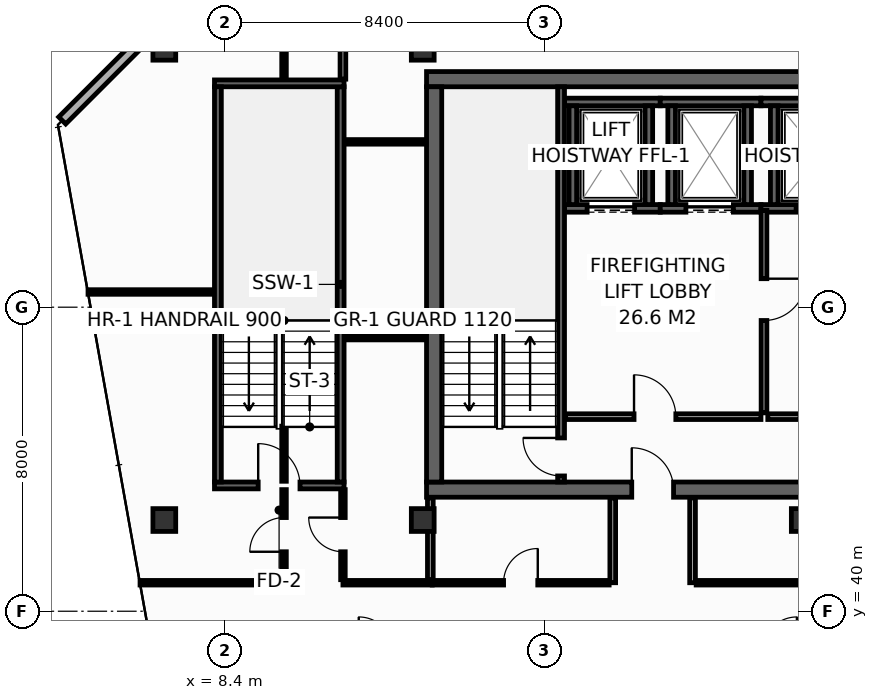
"""IFC4 building model, lengths in metres.
Left out: names, types, materials, properties, quantities, classifications, styles, units other than length and angle.
Written with IfcOpenShell. Run it as: python <this file> out.ifc"""

import sys

from ifc_helpers import new_model, si_unit, direction, frame, frame_2d, origin, origin_2d, place, context, subcontext, project, spatial, rectangle, hollow_rectangle, extrude, element, fill, save


model = new_model("IFC4")
c1 = context("Model", 3, precision=1e-05, world=origin(), true_north=direction((0.0, 1.0)))
c2 = subcontext(c1, "Body", "Model", "MODEL_VIEW")
j1 = project(units=[si_unit("LENGTHUNIT", "METRE"), si_unit("PLANEANGLEUNIT", "RADIAN")], contexts=[c1])
p1 = place(None, origin())
s1 = spatial("IfcSite", under=j1, at=p1, CompositionType="ELEMENT")
p2 = place(p1, origin())
s2 = spatial("IfcBuilding", under=s1, at=p2, CompositionType="ELEMENT")
p3 = place(p2, frame((0.0, 0.0, 264.8)))
s3 = spatial("IfcBuildingStorey", under=s2, at=p3, CompositionType="ELEMENT", Elevation=264.8)
p4 = place(p3, frame((13.7, 43.2, 0.0), z_axis=(0.0, 0.0, 1.0), x_axis=(1.0, 0.0, 0.0)))
e1 = element("IfcWall", 1, at=p4, inside=s3, PredefinedType="SHEAR", context=c2, shape_type="SweptSolid", body=[
    extrude(rectangle(XDim=32.5, YDim=0.4, at=frame_2d((16.25, 0.0))), origin(), (0.0, 0.0, 1.0), 3.55),
])
p5 = place(p4, frame((5.4, 0.0, 0.0)))
e2 = element("IfcOpeningElement", 2, at=p5, cuts=e1, PredefinedType="OPENING", context=c2, shape_type="SweptSolid", body=[
    extrude(rectangle(XDim=1.1, YDim=2.15, at=frame_2d((0.55, 1.075))), frame((0.0, 0.21, 0.0), z_axis=(0.0, -1.0, 0.0), x_axis=(1.0, 0.0, 0.0)), (0.0, 0.0, 1.0), 0.42),
])
p6 = place(p4, frame((25.6, 0.0, 0.0)))
e3 = element("IfcOpeningElement", 3, at=p6, cuts=e1, PredefinedType="OPENING", context=c2, shape_type="SweptSolid", body=[
    extrude(rectangle(XDim=1.1, YDim=2.15, at=frame_2d((0.55, 1.075))), frame((0.0, 0.21, 0.0), z_axis=(0.0, -1.0, 0.0), x_axis=(1.0, 0.0, 0.0)), (0.0, 0.0, 1.0), 0.42),
])
p7 = place(p3, frame((13.7, 54.0, 0.0), z_axis=(0.0, 0.0, 1.0), x_axis=(1.0, 0.0, 0.0)))
e4 = element("IfcWall", 4, at=p7, inside=s3, PredefinedType="SHEAR", context=c2, shape_type="SweptSolid", body=[
    extrude(rectangle(XDim=32.5, YDim=0.4, at=frame_2d((16.25, 0.0))), origin(), (0.0, 0.0, 1.0), 3.55),
])
p8 = place(p3, frame((13.9, 43.4, 0.0), z_axis=(0.0, 0.0, 1.0), x_axis=(0.0, 1.0, 0.0)))
e5 = element("IfcWall", 5, at=p8, inside=s3, PredefinedType="SHEAR", context=c2, shape_type="SweptSolid", body=[
    extrude(rectangle(XDim=10.4, YDim=0.4, at=frame_2d((5.2, 0.0))), origin(), (0.0, 0.0, 1.0), 3.55),
])
for number, where, z_axis, x_axis in (
    (6, (6.8, 54.8, 0.0), (0.0, 0.0, 1.0), (1.0, 0.0, 0.0)),
    (7, (13.6, 54.8, 0.0), (0.0, 0.0, 1.0), (1.0, 0.0, 0.0)),
    (8, (6.8, 42.4, 0.0), (0.0, 0.0, 1.0), (1.0, 0.0, 0.0)),
    (9, (13.6, 42.4, 0.0), (0.0, 0.0, 1.0), (1.0, 0.0, 0.0)),
    (10, (23.6, 42.4, 0.0), (0.0, 0.0, 1.0), (1.0, 0.0, 0.0)),
):
    element("IfcColumn", number, at=place(p3, frame(where, z_axis=z_axis, x_axis=x_axis)), inside=s3, PredefinedType="COLUMN", context=c2, shape_type="SweptSolid", body=[
        extrude(hollow_rectangle(XDim=0.6, YDim=0.6, WallThickness=0.028, at=origin_2d()), origin(), (0.0, 0.0, 1.0), 3.8),
    ])
p9 = place(p3, frame((17.33, 50.6, 0.0), z_axis=(0.0, 0.0, 1.0), x_axis=(1.0, 0.0, 0.0)))
e11 = element("IfcWall", 11, at=p9, inside=s3, PredefinedType="SHEAR", context=c2, shape_type="SweptSolid", body=[
    extrude(rectangle(XDim=2.52, YDim=0.2, at=frame_2d((1.26, 0.0))), origin(), (0.0, 0.0, 1.0), 3.55),
])
p10 = place(p9, frame((0.595, 0.0, 0.0)))
e12 = element("IfcOpeningElement", 12, at=p10, cuts=e11, PredefinedType="OPENING", context=c2, shape_type="SweptSolid", body=[
    extrude(rectangle(XDim=1.25, YDim=2.3, at=frame_2d((0.625, 1.15))), frame((0.0, 0.11, 0.0), z_axis=(0.0, -1.0, 0.0), x_axis=(1.0, 0.0, 0.0)), (0.0, 0.0, 1.0), 0.22),
])
p11 = place(p3, frame((17.33, 53.4, 0.0), z_axis=(0.0, 0.0, 1.0), x_axis=(1.0, 0.0, 0.0)))
e13 = element("IfcWall", 13, at=p11, inside=s3, PredefinedType="SHEAR", context=c2, shape_type="SweptSolid", body=[
    extrude(rectangle(XDim=2.52, YDim=0.2, at=frame_2d((1.26, 0.0))), origin(), (0.0, 0.0, 1.0), 3.55),
])
for number, where, z_axis, x_axis in (
    (14, (17.55, 50.7, 0.0), (0.0, 0.0, 1.0), (0.0, 1.0, 0.0)),
    (15, (19.55, 50.7, 0.0), (0.0, 0.0, 1.0), (0.0, 1.0, 0.0)),
):
    element("IfcWall", number, at=place(p3, frame(where, z_axis=z_axis, x_axis=x_axis)), inside=s3, PredefinedType="SHEAR", context=c2, shape_type="SweptSolid", body=[
        extrude(rectangle(XDim=2.6, YDim=0.2, at=frame_2d((1.3, 0.0))), origin(), (0.0, 0.0, 1.0), 3.55),
    ])
p12 = place(p3, frame((19.85, 50.6, 0.0), z_axis=(0.0, 0.0, 1.0), x_axis=(1.0, 0.0, 0.0)))
e16 = element("IfcWall", 16, at=p12, inside=s3, PredefinedType="SHEAR", context=c2, shape_type="SweptSolid", body=[
    extrude(rectangle(XDim=2.65, YDim=0.2, at=frame_2d((1.325, 0.0))), origin(), (0.0, 0.0, 1.0), 3.55),
])
p13 = place(p12, frame((0.675, 0.0, 0.0)))
e17 = element("IfcOpeningElement", 17, at=p13, cuts=e16, PredefinedType="OPENING", context=c2, shape_type="SweptSolid", body=[
    extrude(rectangle(XDim=1.25, YDim=2.3, at=frame_2d((0.625, 1.15))), frame((0.0, 0.11, 0.0), z_axis=(0.0, -1.0, 0.0), x_axis=(1.0, 0.0, 0.0)), (0.0, 0.0, 1.0), 0.22),
])
p14 = place(p3, frame((19.85, 53.4, 0.0), z_axis=(0.0, 0.0, 1.0), x_axis=(1.0, 0.0, 0.0)))
e18 = element("IfcWall", 18, at=p14, inside=s3, PredefinedType="SHEAR", context=c2, shape_type="SweptSolid", body=[
    extrude(rectangle(XDim=2.65, YDim=0.2, at=frame_2d((1.325, 0.0))), origin(), (0.0, 0.0, 1.0), 3.55),
])
for number, where, z_axis, x_axis in (
    (19, (20.15, 50.7, 0.0), (0.0, 0.0, 1.0), (0.0, 1.0, 0.0)),
    (20, (22.15, 50.7, 0.0), (0.0, 0.0, 1.0), (0.0, 1.0, 0.0)),
):
    element("IfcWall", number, at=place(p3, frame(where, z_axis=z_axis, x_axis=x_axis)), inside=s3, PredefinedType="SHEAR", context=c2, shape_type="SweptSolid", body=[
        extrude(rectangle(XDim=2.6, YDim=0.2, at=frame_2d((1.3, 0.0))), origin(), (0.0, 0.0, 1.0), 3.55),
    ])
p15 = place(p3, frame((22.5, 50.6, 0.0), z_axis=(0.0, 0.0, 1.0), x_axis=(1.0, 0.0, 0.0)))
e21 = element("IfcWall", 21, at=p15, inside=s3, PredefinedType="SHEAR", context=c2, shape_type="SweptSolid", body=[
    extrude(rectangle(XDim=2.85, YDim=0.2, at=frame_2d((1.425, 0.0))), origin(), (0.0, 0.0, 1.0), 3.55),
])
p16 = place(p15, frame((0.925, 0.0, 0.0)))
e22 = element("IfcOpeningElement", 22, at=p16, cuts=e21, PredefinedType="OPENING", context=c2, shape_type="SweptSolid", body=[
    extrude(rectangle(XDim=1.25, YDim=2.3, at=frame_2d((0.625, 1.15))), frame((0.0, 0.11, 0.0), z_axis=(0.0, -1.0, 0.0), x_axis=(1.0, 0.0, 0.0)), (0.0, 0.0, 1.0), 0.22),
])
p17 = place(p3, frame((22.5, 53.4, 0.0), z_axis=(0.0, 0.0, 1.0), x_axis=(1.0, 0.0, 0.0)))
e23 = element("IfcWall", 23, at=p17, inside=s3, PredefinedType="SHEAR", context=c2, shape_type="SweptSolid", body=[
    extrude(rectangle(XDim=2.85, YDim=0.2, at=frame_2d((1.425, 0.0))), origin(), (0.0, 0.0, 1.0), 3.55),
])
p18 = place(p3, frame((22.85, 50.7, 0.0), z_axis=(0.0, 0.0, 1.0), x_axis=(0.0, 1.0, 0.0)))
e24 = element("IfcWall", 24, at=p18, inside=s3, PredefinedType="SHEAR", context=c2, shape_type="SweptSolid", body=[
    extrude(rectangle(XDim=2.6, YDim=0.2, at=frame_2d((1.3, 0.0))), origin(), (0.0, 0.0, 1.0), 3.55),
])
p19 = place(p3, frame((17.24, 43.4, 0.0), z_axis=(0.0, 0.0, 1.0), x_axis=(0.0, 1.0, 0.0)))
e25 = element("IfcWall", 25, at=p19, inside=s3, PredefinedType="SHEAR", context=c2, shape_type="SweptSolid", body=[
    extrude(rectangle(XDim=10.4, YDim=0.18, at=frame_2d((5.2, 0.0))), origin(), (0.0, 0.0, 1.0), 3.55),
])
p20 = place(p19, frame((0.16, 0.0, 0.0)))
e26 = element("IfcOpeningElement", 26, at=p20, cuts=e25, PredefinedType="OPENING", context=c2, shape_type="SweptSolid", body=[
    extrude(rectangle(XDim=1.0, YDim=2.15, at=frame_2d((0.5, 1.075))), frame((0.0, 0.1, 0.0), z_axis=(0.0, -1.0, 0.0), x_axis=(1.0, 0.0, 0.0)), (0.0, 0.0, 1.0), 0.2),
])
p21 = place(p3, frame((8.12, 43.31, 0.0), z_axis=(0.0, 0.0, 1.0), x_axis=(1.0, 0.0, 0.0)))
e27 = element("IfcWall", 27, at=p21, inside=s3, PredefinedType="SHEAR", context=c2, shape_type="SweptSolid", body=[
    extrude(rectangle(XDim=3.41, YDim=0.18, at=frame_2d((1.705, 0.0))), origin(), (0.0, 0.0, 1.0), 3.55),
])
p22 = place(p21, frame((1.15, 0.0, 0.0)))
e28 = element("IfcOpeningElement", 28, at=p22, cuts=e27, PredefinedType="OPENING", context=c2, shape_type="SweptSolid", body=[
    extrude(rectangle(XDim=1.1, YDim=2.15, at=frame_2d((0.55, 1.075))), frame((0.0, 0.1, 0.0), z_axis=(0.0, -1.0, 0.0), x_axis=(1.0, 0.0, 0.0)), (0.0, 0.0, 1.0), 0.2),
])
p23 = place(p3, frame((11.44, 43.4, 0.0), z_axis=(0.0, 0.0, 1.0), x_axis=(0.0, 1.0, 0.0)))
e29 = element("IfcWall", 29, at=p23, inside=s3, PredefinedType="SHEAR", context=c2, shape_type="SweptSolid", body=[
    extrude(rectangle(XDim=10.4, YDim=0.18, at=frame_2d((5.2, 0.0))), origin(), (0.0, 0.0, 1.0), 3.55),
])
p24 = place(p3, frame((11.53, 53.89, 0.0), z_axis=(0.0, 0.0, 1.0), x_axis=(-1.0, 0.0, 0.0)))
e30 = element("IfcWall", 30, at=p24, inside=s3, PredefinedType="SHEAR", context=c2, shape_type="SweptSolid", body=[
    extrude(rectangle(XDim=3.41, YDim=0.18, at=frame_2d((1.705, 0.0))), origin(), (0.0, 0.0, 1.0), 3.55),
])
p25 = place(p3, frame((8.21, 53.8, 0.0), z_axis=(0.0, 0.0, 1.0), x_axis=(0.0, -1.0, 0.0)))
e31 = element("IfcWall", 31, at=p25, inside=s3, PredefinedType="SHEAR", context=c2, shape_type="SweptSolid", body=[
    extrude(rectangle(XDim=10.4, YDim=0.18, at=frame_2d((5.2, 0.0))), origin(), (0.0, 0.0, 1.0), 3.55),
])
p26 = place(p3, frame((17.36, 45.12, 0.0), z_axis=(0.0, 0.0, 1.0), x_axis=(1.0, 0.0, 0.0)))
e32 = element("IfcWall", 32, at=p26, inside=s3, PredefinedType="PARTITIONING", context=c2, shape_type="SweptSolid", body=[
    extrude(rectangle(XDim=5.14, YDim=0.15, at=frame_2d((2.57, 0.0))), origin(), (0.0, 0.0, 1.0), 3.55),
])
p27 = place(p26, frame((1.8, 0.0, 0.0)))
e33 = element("IfcOpeningElement", 33, at=p27, cuts=e32, PredefinedType="OPENING", context=c2, shape_type="SweptSolid", body=[
    extrude(rectangle(XDim=1.1, YDim=2.15, at=frame_2d((0.55, 1.075))), frame((0.0, 0.085, 0.0), z_axis=(0.0, -1.0, 0.0), x_axis=(1.0, 0.0, 0.0)), (0.0, 0.0, 1.0), 0.17),
])
p28 = place(p3, frame((22.58, 50.55, 0.0), z_axis=(0.0, 0.0, 1.0), x_axis=(0.0, -1.0, 0.0)))
e34 = element("IfcWall", 34, at=p28, inside=s3, PredefinedType="PARTITIONING", context=c2, shape_type="SweptSolid", body=[
    extrude(rectangle(XDim=5.33, YDim=0.15, at=frame_2d((2.665, 0.0))), origin(), (0.0, 0.0, 1.0), 3.55),
])
p29 = place(p28, frame((1.8, 0.0, 0.0)))
e35 = element("IfcOpeningElement", 35, at=p29, cuts=e34, PredefinedType="OPENING", context=c2, shape_type="SweptSolid", body=[
    extrude(rectangle(XDim=1.1, YDim=2.15, at=frame_2d((0.55, 1.075))), frame((0.0, 0.085, 0.0), z_axis=(0.0, -1.0, 0.0), x_axis=(1.0, 0.0, 0.0)), (0.0, 0.0, 1.0), 0.17),
])
p30 = place(p3, frame((22.68, 45.12, 0.0), z_axis=(0.0, 0.0, 1.0), x_axis=(1.0, 0.0, 0.0)))
e36 = element("IfcWall", 36, at=p30, inside=s3, PredefinedType="PARTITIONING", context=c2, shape_type="SweptSolid", body=[
    extrude(rectangle(XDim=2.92, YDim=0.15, at=frame_2d((1.46, 0.0))), origin(), (0.0, 0.0, 1.0), 3.55),
])
p31 = place(p30, frame((0.85, 0.0, 0.0)))
e37 = element("IfcOpeningElement", 37, at=p31, cuts=e36, PredefinedType="OPENING", context=c2, shape_type="SweptSolid", body=[
    extrude(rectangle(XDim=1.1, YDim=2.15, at=frame_2d((0.55, 1.075))), frame((0.0, 0.085, 0.0), z_axis=(0.0, -1.0, 0.0), x_axis=(1.0, 0.0, 0.0)), (0.0, 0.0, 1.0), 0.17),
])
p32 = place(p3, frame((7.087, 55.887, 0.0), z_axis=(0.0, 0.0, 1.0), x_axis=(-0.707106781187, -0.707106781187, 0.0)))
e38 = element("IfcWall", 38, at=p32, inside=s3, PredefinedType="STANDARD", context=c2, shape_type="SweptSolid", body=[
    extrude(rectangle(XDim=4.206, YDim=0.26, at=frame_2d((2.103, 0.0))), origin(), (0.0, 0.0, 1.0), 3.55),
])
p33 = place(p3, frame((6.161, 40.75, 0.0), z_axis=(0.0, 0.0, 1.0), x_axis=(1.0, 0.0, 0.0)))
e39 = element("IfcWall", 39, at=p33, inside=s3, PredefinedType="PARTITIONING", context=c2, shape_type="SweptSolid", body=[
    extrude(rectangle(XDim=3.789, YDim=0.12, at=frame_2d((1.894, 0.0))), origin(), (0.0, 0.0, 1.0), 3.085),
])
p34 = place(p3, frame((11.5, 40.75, 0.0), z_axis=(0.0, 0.0, 1.0), x_axis=(1.0, 0.0, 0.0)))
e40 = element("IfcWall", 40, at=p34, inside=s3, PredefinedType="PARTITIONING", context=c2, shape_type="SweptSolid", body=[
    extrude(rectangle(XDim=2.35, YDim=0.12, at=frame_2d((1.175, 0.0))), origin(), (0.0, 0.0, 1.0), 3.55),
])
p35 = place(p3, frame((11.55, 52.35, 0.0), z_axis=(0.0, 0.0, 1.0), x_axis=(1.0, 0.0, 0.0)))
e41 = element("IfcWall", 41, at=p35, inside=s3, PredefinedType="PARTITIONING", context=c2, shape_type="SweptSolid", body=[
    extrude(rectangle(XDim=2.13, YDim=0.12, at=frame_2d((1.065, 0.0))), origin(), (0.0, 0.0, 1.0), 3.55),
])
p36 = place(p3, frame((11.5, 54.0, 0.0), z_axis=(0.0, 0.0, 1.0), x_axis=(0.0, 1.0, 0.0)))
e42 = element("IfcWall", 42, at=p36, inside=s3, PredefinedType="PARTITIONING", context=c2, shape_type="SweptSolid", body=[
    extrude(rectangle(XDim=1.995, YDim=0.15, at=frame_2d((0.998, 0.0))), origin(), (0.0, 0.0, 1.0), 2.935),
])
p37 = place(p3, frame((4.792, 48.4, 0.0), z_axis=(0.0, 0.0, 1.0), x_axis=(1.0, 0.0, 0.0)))
e43 = element("IfcWall", 43, at=p37, inside=s3, PredefinedType="PARTITIONING", context=c2, shape_type="SweptSolid", body=[
    extrude(rectangle(XDim=3.308, YDim=0.12, at=frame_2d((1.654, 0.0))), origin(), (0.0, 0.0, 1.0), 2.947),
])
p38 = place(p3, frame((9.95, 40.83, 0.0), z_axis=(0.0, 0.0, 1.0), x_axis=(0.0, 1.0, 0.0)))
e44 = element("IfcWall", 44, at=p38, inside=s3, PredefinedType="PARTITIONING", context=c2, shape_type="SweptSolid", body=[
    extrude(rectangle(XDim=2.37, YDim=0.12, at=frame_2d((1.185, 0.0))), origin(), (0.0, 0.0, 1.0), 2.947),
])
p39 = place(p38, frame((0.735, 0.0, 0.0)))
e45 = element("IfcOpeningElement", 45, at=p39, cuts=e44, PredefinedType="OPENING", context=c2, shape_type="SweptSolid", body=[
    extrude(rectangle(XDim=0.9, YDim=2.1, at=frame_2d((0.45, 1.05))), frame((0.0, 0.07, 0.0), z_axis=(0.0, -1.0, 0.0), x_axis=(1.0, 0.0, 0.0)), (0.0, 0.0, 1.0), 0.14),
])
p40 = place(p3, frame((9.95, 43.42, 0.0), z_axis=(0.0, 0.0, 1.0), x_axis=(0.0, 1.0, 0.0)))
e46 = element("IfcWall", 46, at=p40, inside=s3, PredefinedType="PARTITIONING", context=c2, shape_type="SweptSolid", body=[
    extrude(rectangle(XDim=1.45, YDim=0.12, at=frame_2d((0.725, 0.0))), origin(), (0.0, 0.0, 1.0), 3.55),
])
p41 = place(p3, frame((9.95, 54.0, 0.0), z_axis=(0.0, 0.0, 1.0), x_axis=(0.0, 1.0, 0.0)))
e47 = element("IfcWall", 47, at=p41, inside=s3, PredefinedType="PARTITIONING", context=c2, shape_type="SweptSolid", body=[
    extrude(rectangle(XDim=1.995, YDim=0.12, at=frame_2d((0.998, 0.0))), origin(), (0.0, 0.0, 1.0), 2.935),
])
p42 = place(p3, frame((11.55, 47.2, 0.0), z_axis=(0.0, 0.0, 1.0), x_axis=(1.0, 0.0, 0.0)))
e48 = element("IfcWall", 48, at=p42, inside=s3, PredefinedType="PARTITIONING", context=c2, shape_type="SweptSolid", body=[
    extrude(rectangle(XDim=2.13, YDim=0.12, at=frame_2d((1.065, 0.0))), origin(), (0.0, 0.0, 1.0), 3.55),
])
p43 = place(p3, frame((11.5, 40.83, 0.0), z_axis=(0.0, 0.0, 1.0), x_axis=(0.0, 1.0, 0.0)))
e49 = element("IfcWall", 49, at=p43, inside=s3, PredefinedType="PARTITIONING", context=c2, shape_type="SweptSolid", body=[
    extrude(rectangle(XDim=2.37, YDim=0.12, at=frame_2d((1.185, 0.0))), origin(), (0.0, 0.0, 1.0), 2.947),
])
p44 = place(p43, frame((0.735, 0.0, 0.0)))
e50 = element("IfcOpeningElement", 50, at=p44, cuts=e49, PredefinedType="OPENING", context=c2, shape_type="SweptSolid", body=[
    extrude(rectangle(XDim=0.9, YDim=2.1, at=frame_2d((0.45, 1.05))), frame((0.0, 0.07, 0.0), z_axis=(0.0, -1.0, 0.0), x_axis=(1.0, 0.0, 0.0)), (0.0, 0.0, 1.0), 0.14),
])
p45 = place(p3, frame((13.8, 40.83, 0.0), z_axis=(0.0, 0.0, 1.0), x_axis=(0.0, 1.0, 0.0)))
e51 = element("IfcWall", 51, at=p45, inside=s3, PredefinedType="PARTITIONING", context=c2, shape_type="SweptSolid", body=[
    extrude(rectangle(XDim=2.15, YDim=0.15, at=frame_2d((1.075, 0.0))), origin(), (0.0, 0.0, 1.0), 3.55),
])
for number, where, z_axis, x_axis in (
    (52, (18.6, 40.75, 0.0), (0.0, 0.0, 1.0), (0.0, 1.0, 0.0)),
    (53, (20.7, 40.75, 0.0), (0.0, 0.0, 1.0), (0.0, 1.0, 0.0)),
):
    element("IfcWall", number, at=place(p3, frame(where, z_axis=z_axis, x_axis=x_axis)), inside=s3, PredefinedType="PARTITIONING", context=c2, shape_type="SweptSolid", body=[
        extrude(rectangle(XDim=2.23, YDim=0.15, at=frame_2d((1.115, 0.0))), origin(), (0.0, 0.0, 1.0), 3.55),
    ])
p46 = place(p3, frame((13.85, 40.75, 0.0), z_axis=(0.0, 0.0, 1.0), x_axis=(1.0, 0.0, 0.0)))
e54 = element("IfcWall", 54, at=p46, inside=s3, PredefinedType="PARTITIONING", context=c2, shape_type="SweptSolid", body=[
    extrude(rectangle(XDim=4.655, YDim=0.12, at=frame_2d((2.327, 0.0))), origin(), (0.0, 0.0, 1.0), 3.55),
])
p47 = place(p46, frame((1.877, 0.0, 0.0)))
e55 = element("IfcOpeningElement", 55, at=p47, cuts=e54, PredefinedType="OPENING", context=c2, shape_type="SweptSolid", body=[
    extrude(rectangle(XDim=0.9, YDim=2.1, at=frame_2d((0.45, 1.05))), frame((0.0, 0.07, 0.0), z_axis=(0.0, -1.0, 0.0), x_axis=(1.0, 0.0, 0.0)), (0.0, 0.0, 1.0), 0.14),
])
p48 = place(p3, frame((20.795, 40.75, 0.0), z_axis=(0.0, 0.0, 1.0), x_axis=(1.0, 0.0, 0.0)))
e56 = element("IfcWall", 56, at=p48, inside=s3, PredefinedType="PARTITIONING", context=c2, shape_type="SweptSolid", body=[
    extrude(rectangle(XDim=17.91, YDim=0.12, at=frame_2d((8.955, 0.0))), origin(), (0.0, 0.0, 1.0), 2.947),
])
p49 = place(p48, frame((8.505, 0.0, 0.0)))
e57 = element("IfcOpeningElement", 57, at=p49, cuts=e56, PredefinedType="OPENING", context=c2, shape_type="SweptSolid", body=[
    extrude(rectangle(XDim=0.9, YDim=2.1, at=frame_2d((0.45, 1.05))), frame((0.0, 0.07, 0.0), z_axis=(0.0, -1.0, 0.0), x_axis=(1.0, 0.0, 0.0)), (0.0, 0.0, 1.0), 0.14),
])
p50 = place(p10, origin())
e58 = element("IfcDoor", 58, at=p50, inside=s3, OperationType="SLIDING_TO_LEFT", PredefinedType="DOOR", context=c2, shape_type="SweptSolid", body=[
    extrude(rectangle(XDim=1.25, YDim=2.3, at=frame_2d((0.625, 1.15))), frame((0.0, 0.025, 0.0), z_axis=(0.0, -1.0, 0.0), x_axis=(1.0, 0.0, 0.0)), (0.0, 0.0, 1.0), 0.05),
])
fill(e12, e58)
p51 = place(p13, origin())
e59 = element("IfcDoor", 59, at=p51, inside=s3, OperationType="SLIDING_TO_LEFT", PredefinedType="DOOR", context=c2, shape_type="SweptSolid", body=[
    extrude(rectangle(XDim=1.25, YDim=2.3, at=frame_2d((0.625, 1.15))), frame((0.0, 0.025, 0.0), z_axis=(0.0, -1.0, 0.0), x_axis=(1.0, 0.0, 0.0)), (0.0, 0.0, 1.0), 0.05),
])
fill(e17, e59)
p52 = place(p16, origin())
e60 = element("IfcDoor", 60, at=p52, inside=s3, OperationType="SLIDING_TO_LEFT", PredefinedType="DOOR", context=c2, shape_type="SweptSolid", body=[
    extrude(rectangle(XDim=1.25, YDim=2.3, at=frame_2d((0.625, 1.15))), frame((0.0, 0.025, 0.0), z_axis=(0.0, -1.0, 0.0), x_axis=(1.0, 0.0, 0.0)), (0.0, 0.0, 1.0), 0.05),
])
fill(e22, e60)
p53 = place(p20, origin())
e61 = element("IfcDoor", 61, at=p53, inside=s3, OperationType="SINGLE_SWING_RIGHT", PredefinedType="DOOR", context=c2, shape_type="SweptSolid", body=[
    extrude(rectangle(XDim=1.0, YDim=2.15, at=frame_2d((0.5, 1.075))), frame((0.0, 0.025, 0.0), z_axis=(0.0, -1.0, 0.0), x_axis=(1.0, 0.0, 0.0)), (0.0, 0.0, 1.0), 0.05),
])
fill(e26, e61)
p54 = place(p22, origin())
e62 = element("IfcDoor", 62, at=p54, inside=s3, OperationType="SINGLE_SWING_LEFT", PredefinedType="DOOR", context=c2, shape_type="SweptSolid", body=[
    extrude(rectangle(XDim=1.1, YDim=2.15, at=frame_2d((0.55, 1.075))), frame((0.0, 0.025, 0.0), z_axis=(0.0, -1.0, 0.0), x_axis=(1.0, 0.0, 0.0)), (0.0, 0.0, 1.0), 0.05),
])
fill(e28, e62)
p55 = place(p27, origin())
e63 = element("IfcDoor", 63, at=p55, inside=s3, OperationType="SINGLE_SWING_LEFT", PredefinedType="DOOR", context=c2, shape_type="SweptSolid", body=[
    extrude(rectangle(XDim=1.1, YDim=2.15, at=frame_2d((0.55, 1.075))), frame((0.0, 0.025, 0.0), z_axis=(0.0, -1.0, 0.0), x_axis=(1.0, 0.0, 0.0)), (0.0, 0.0, 1.0), 0.05),
])
fill(e33, e63)
p56 = place(p29, origin())
e64 = element("IfcDoor", 64, at=p56, inside=s3, OperationType="SINGLE_SWING_LEFT", PredefinedType="DOOR", context=c2, shape_type="SweptSolid", body=[
    extrude(rectangle(XDim=1.1, YDim=2.15, at=frame_2d((0.55, 1.075))), frame((0.0, 0.025, 0.0), z_axis=(0.0, -1.0, 0.0), x_axis=(1.0, 0.0, 0.0)), (0.0, 0.0, 1.0), 0.05),
])
fill(e35, e64)
p57 = place(p5, origin())
e65 = element("IfcDoor", 65, at=p57, inside=s3, OperationType="SINGLE_SWING_LEFT", PredefinedType="DOOR", context=c2, shape_type="SweptSolid", body=[
    extrude(rectangle(XDim=1.1, YDim=2.15, at=frame_2d((0.55, 1.075))), frame((0.0, 0.025, 0.0), z_axis=(0.0, -1.0, 0.0), x_axis=(1.0, 0.0, 0.0)), (0.0, 0.0, 1.0), 0.05),
])
fill(e2, e65)
p58 = place(p39, origin())
e66 = element("IfcDoor", 66, at=p58, inside=s3, OperationType="SINGLE_SWING_LEFT", PredefinedType="DOOR", context=c2, shape_type="SweptSolid", body=[
    extrude(rectangle(XDim=0.9, YDim=2.1, at=frame_2d((0.45, 1.05))), frame((0.0, 0.025, 0.0), z_axis=(0.0, -1.0, 0.0), x_axis=(1.0, 0.0, 0.0)), (0.0, 0.0, 1.0), 0.05),
])
fill(e45, e66)
p59 = place(p44, origin())
e67 = element("IfcDoor", 67, at=p59, inside=s3, OperationType="SINGLE_SWING_RIGHT", PredefinedType="DOOR", context=c2, shape_type="SweptSolid", body=[
    extrude(rectangle(XDim=0.9, YDim=2.1, at=frame_2d((0.45, 1.05))), frame((0.0, 0.025, 0.0), z_axis=(0.0, -1.0, 0.0), x_axis=(1.0, 0.0, 0.0)), (0.0, 0.0, 1.0), 0.05),
])
fill(e50, e67)
p60 = place(p47, origin())
e68 = element("IfcDoor", 68, at=p60, inside=s3, OperationType="SINGLE_SWING_RIGHT", PredefinedType="DOOR", context=c2, shape_type="SweptSolid", body=[
    extrude(rectangle(XDim=0.9, YDim=2.1, at=frame_2d((0.45, 1.05))), frame((0.0, 0.025, 0.0), z_axis=(0.0, -1.0, 0.0), x_axis=(1.0, 0.0, 0.0)), (0.0, 0.0, 1.0), 0.05),
])
fill(e55, e68)
save(model, sys.argv[1])
